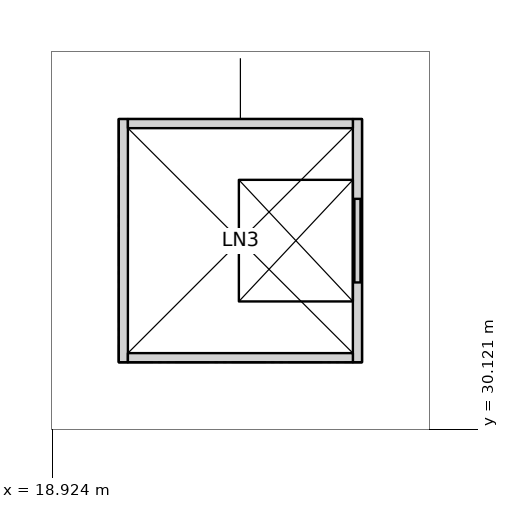
"""IFC4 building model, lengths in metres.
Left out: names, types, materials, properties, quantities, classifications, styles, units other than length and angle.
Written with IfcOpenShell. Run it as: python <this file> out.ifc"""

import sys

from ifc_helpers import new_model, si_unit, direction, frame, frame_2d, origin, place, context, subcontext, project, spatial, rectangle, extrude, element, fill, save


model = new_model("IFC4")
c1 = context("Model", 3, precision=1e-05, world=origin(), true_north=direction((0.0, 1.0)))
c2 = subcontext(c1, "Body", "Model", "MODEL_VIEW")
j1 = project(units=[si_unit("LENGTHUNIT", "METRE"), si_unit("PLANEANGLEUNIT", "RADIAN")], contexts=[c1])
p1 = place(None, origin())
s1 = spatial("IfcSite", under=j1, at=p1, CompositionType="ELEMENT")
p2 = place(p1, origin())
s2 = spatial("IfcBuilding", under=s1, at=p2, CompositionType="ELEMENT")
p3 = place(p2, frame((0.0, 0.0, 7.0)))
s3 = spatial("IfcBuildingStorey", under=s2, at=p3, CompositionType="ELEMENT", Elevation=7.0)
p4 = place(p3, frame((22.94, 31.0, 0.0), z_axis=(0.0, 0.0, 1.0), x_axis=(0.0, 1.0, 0.0)))
e1 = element("IfcWall", 1, at=p4, inside=s3, PredefinedType="PARTITIONING", context=c2, shape_type="SweptSolid", body=[
    extrude(rectangle(XDim=3.2, YDim=0.12, at=frame_2d((1.6, 0.0))), origin(), (0.0, 0.0, 1.0), 3.6),
])
p5 = place(p4, frame((1.05, 0.0, 0.0)))
e2 = element("IfcOpeningElement", 2, at=p5, cuts=e1, PredefinedType="OPENING", context=c2, shape_type="SweptSolid", body=[
    extrude(rectangle(XDim=1.1, YDim=2.1, at=frame_2d((0.55, 1.05))), frame((0.0, 0.07, 0.0), z_axis=(0.0, -1.0, 0.0), x_axis=(1.0, 0.0, 0.0)), (0.0, 0.0, 1.0), 0.14),
])
p6 = place(p3, frame((19.86, 31.0, 0.0), z_axis=(0.0, 0.0, 1.0), x_axis=(0.0, 1.0, 0.0)))
e3 = element("IfcWall", 3, at=p6, inside=s3, PredefinedType="PARTITIONING", context=c2, shape_type="SweptSolid", body=[
    extrude(rectangle(XDim=3.2, YDim=0.12, at=frame_2d((1.6, 0.0))), origin(), (0.0, 0.0, 1.0), 3.6),
])
for number, where, z_axis, x_axis in (
    (4, (19.92, 31.06, 0.0), (0.0, 0.0, 1.0), (1.0, 0.0, 0.0)),
    (5, (19.92, 34.14, 0.0), (0.0, 0.0, 1.0), (1.0, 0.0, 0.0)),
):
    element("IfcWall", number, at=place(p3, frame(where, z_axis=z_axis, x_axis=x_axis)), inside=s3, PredefinedType="PARTITIONING", context=c2, shape_type="SweptSolid", body=[
        extrude(rectangle(XDim=2.96, YDim=0.12, at=frame_2d((1.48, 0.0))), origin(), (0.0, 0.0, 1.0), 3.6),
    ])
p7 = place(p5, origin())
e6 = element("IfcDoor", 6, at=p7, inside=s3, OperationType="DOUBLE_DOOR_SLIDING", PredefinedType="DOOR", context=c2, shape_type="SweptSolid", body=[
    extrude(rectangle(XDim=1.1, YDim=2.1, at=frame_2d((0.55, 1.05))), frame((0.0, 0.025, 0.0), z_axis=(0.0, -1.0, 0.0), x_axis=(1.0, 0.0, 0.0)), (0.0, 0.0, 1.0), 0.05),
])
fill(e2, e6)
save(model, sys.argv[1])
